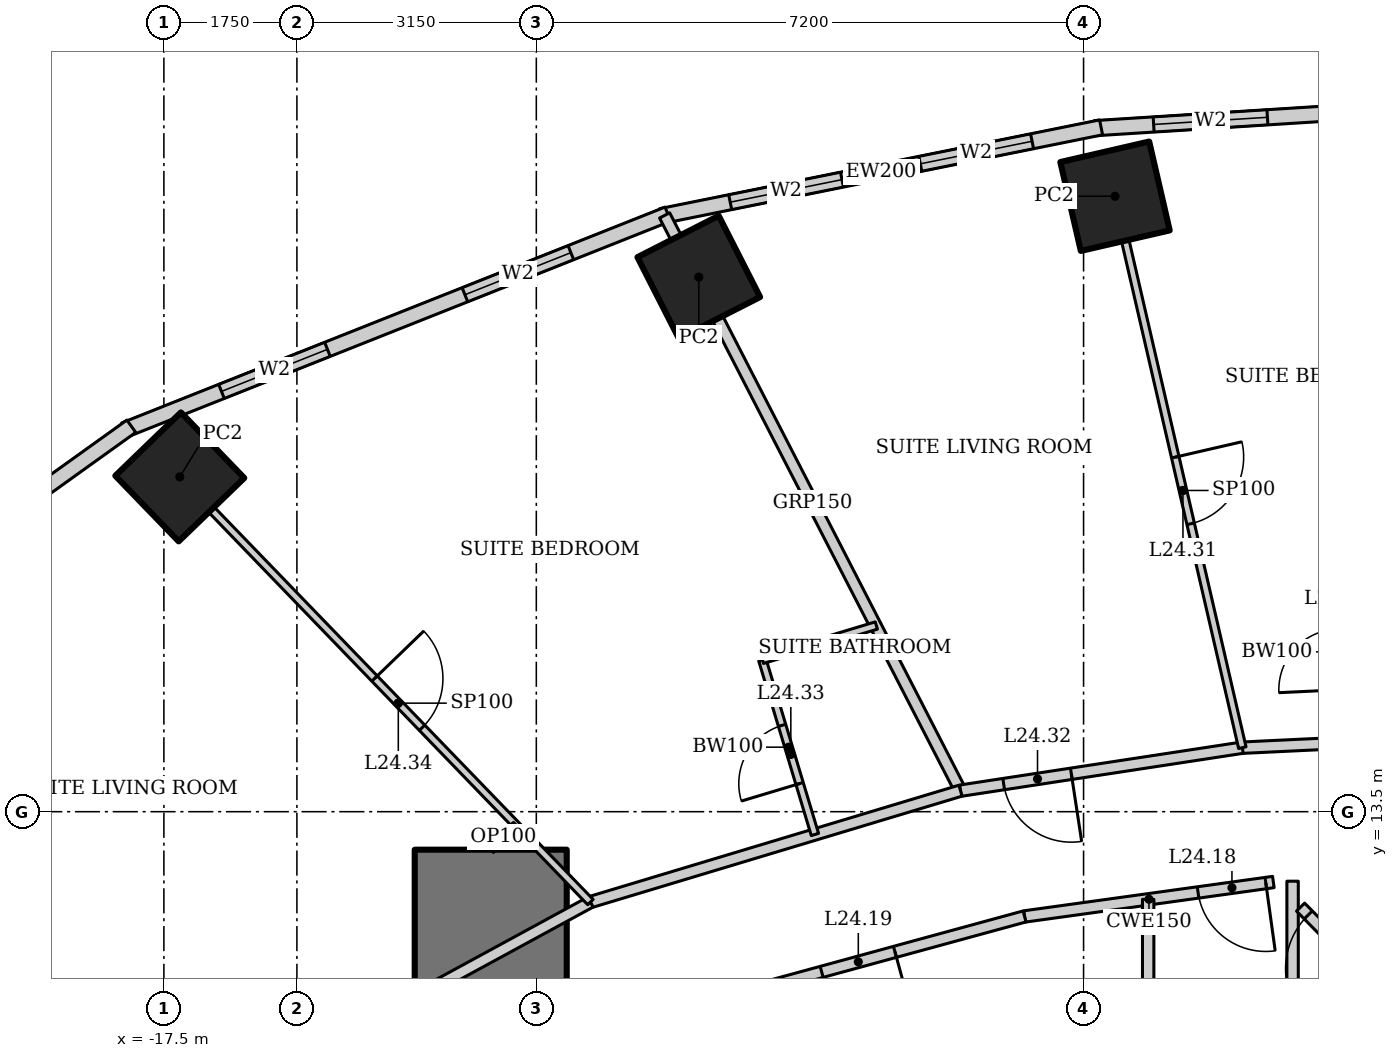
"""IFC4 building model, lengths in metres.
Left out: names, types, materials, properties, quantities, classifications, styles, units other than length and angle.
Written with IfcOpenShell. Run it as: python <this file> out.ifc"""

import sys

from ifc_helpers import new_model, si_unit, direction, frame, frame_2d, origin, origin_2d, place, context, subcontext, project, spatial, rectangle, hollow_rectangle, extrude, element, fill, save


model = new_model("IFC4")
c1 = context("Model", 3, precision=1e-05, world=origin(), true_north=direction((0.0, 1.0)))
c2 = subcontext(c1, "Body", "Model", "MODEL_VIEW")
j1 = project(units=[si_unit("LENGTHUNIT", "METRE"), si_unit("PLANEANGLEUNIT", "RADIAN")], contexts=[c1])
p1 = place(None, origin())
s1 = spatial("IfcSite", under=j1, at=p1, CompositionType="ELEMENT")
p2 = place(p1, origin())
s2 = spatial("IfcBuilding", under=s1, at=p2, CompositionType="ELEMENT")
p3 = place(p2, frame((0.0, 0.0, 101.8)))
s3 = spatial("IfcBuildingStorey", under=s2, at=p3, CompositionType="ELEMENT", Elevation=101.8)
for number, where, z_axis, x_axis in (
    (1, (-4.986, 21.598, 0.0), (0.0, 0.0, 1.0), (0.974, 0.225, 0.0)),
    (2, (-10.463, 20.534, 0.0), (0.0, 0.0, 1.0), (0.891, 0.454, 0.0)),
    (3, (-17.291, 17.905, 0.0), (0.0, 0.0, 1.0), (0.719, 0.695, 0.0)),
):
    element("IfcColumn", number, at=place(p3, frame(where, z_axis=z_axis, x_axis=x_axis)), inside=s3, PredefinedType="COLUMN", context=c2, shape_type="SweptSolid", body=[
        extrude(hollow_rectangle(XDim=1.2, YDim=1.2, WallThickness=0.1, at=origin_2d()), origin(), (0.0, 0.0, 1.0), 2.28),
    ])
p4 = place(p3, frame((-13.2, 13.0, 0.0), z_axis=(0.0, 0.0, 1.0), x_axis=(0.0, -1.0, 0.0)))
e4 = element("IfcWall", 4, at=p4, inside=s3, PredefinedType="SHEAR", context=c2, shape_type="SweptSolid", body=[
    extrude(rectangle(XDim=26.0, YDim=2.0, at=frame_2d((13.0, 0.0))), origin(), (0.0, 0.0, 1.0), 3.6),
])
p5 = place(p4, frame((12.1, 0.0, 0.0)))
e5 = element("IfcOpeningElement", 5, at=p5, cuts=e4, PredefinedType="OPENING", context=c2, shape_type="SweptSolid", body=[
    extrude(rectangle(XDim=1.8, YDim=2.1, at=frame_2d((0.9, 1.05))), frame((0.0, 1.01, 0.0), z_axis=(0.0, -1.0, 0.0), x_axis=(1.0, 0.0, 0.0)), (0.0, 0.0, 1.0), 2.02),
])
p6 = place(p3, frame((0.041, 22.827, 0.0), z_axis=(0.0, 0.0, 1.0), x_axis=(-0.998018582375, -0.062919863585, 0.0)))
e6 = element("IfcWall", 6, at=p6, inside=s3, PredefinedType="SOLIDWALL", context=c2, shape_type="SweptSolid", body=[
    extrude(rectangle(XDim=5.304, YDim=0.2, at=frame_2d((2.652, 0.0))), origin(), (0.0, 0.0, 1.0), 3.4),
])
p7 = place(p6, frame((0.776, 0.0, 0.5)))
e7 = element("IfcOpeningElement", 7, at=p7, cuts=e6, PredefinedType="OPENING", context=c2, shape_type="SweptSolid", body=[
    extrude(rectangle(XDim=1.5, YDim=2.2, at=frame_2d((0.75, 1.1))), frame((0.0, 0.11, 0.0), z_axis=(0.0, -1.0, 0.0), x_axis=(1.0, 0.0, 0.0)), (0.0, 0.0, 1.0), 0.22),
])
p8 = place(p6, frame((3.028, 0.0, 0.5)))
e8 = element("IfcOpeningElement", 8, at=p8, cuts=e6, PredefinedType="OPENING", context=c2, shape_type="SweptSolid", body=[
    extrude(rectangle(XDim=1.5, YDim=2.2, at=frame_2d((0.75, 1.1))), frame((0.0, 0.11, 0.0), z_axis=(0.0, -1.0, 0.0), x_axis=(1.0, 0.0, 0.0)), (0.0, 0.0, 1.0), 0.22),
])
p9 = place(p3, frame((-5.17, 22.504, 0.0), z_axis=(0.0, 0.0, 1.0), x_axis=(-0.980251657452, -0.197754110105, 0.0)))
e9 = element("IfcWall", 9, at=p9, inside=s3, PredefinedType="SOLIDWALL", context=c2, shape_type="SweptSolid", body=[
    extrude(rectangle(XDim=5.904, YDim=0.2, at=frame_2d((2.952, 0.0))), origin(), (0.0, 0.0, 1.0), 3.4),
])
p10 = place(p9, frame((0.926, 0.0, 0.5)))
e10 = element("IfcOpeningElement", 10, at=p10, cuts=e9, PredefinedType="OPENING", context=c2, shape_type="SweptSolid", body=[
    extrude(rectangle(XDim=1.5, YDim=2.2, at=frame_2d((0.75, 1.1))), frame((0.0, 0.11, 0.0), z_axis=(0.0, -1.0, 0.0), x_axis=(1.0, 0.0, 0.0)), (0.0, 0.0, 1.0), 0.22),
])
p11 = place(p9, frame((3.478, 0.0, 0.5)))
e11 = element("IfcOpeningElement", 11, at=p11, cuts=e9, PredefinedType="OPENING", context=c2, shape_type="SweptSolid", body=[
    extrude(rectangle(XDim=1.5, YDim=2.2, at=frame_2d((0.75, 1.1))), frame((0.0, 0.11, 0.0), z_axis=(0.0, -1.0, 0.0), x_axis=(1.0, 0.0, 0.0)), (0.0, 0.0, 1.0), 0.22),
])
p12 = place(p3, frame((-10.869, 21.363, 0.0), z_axis=(0.0, 0.0, 1.0), x_axis=(-0.929358351251, -0.369178892895, 0.0)))
e12 = element("IfcWall", 12, at=p12, inside=s3, PredefinedType="SOLIDWALL", context=c2, shape_type="SweptSolid", body=[
    extrude(rectangle(XDim=7.692, YDim=0.2, at=frame_2d((3.846, 0.0))), origin(), (0.0, 0.0, 1.0), 3.4),
])
p13 = place(p12, frame((1.373, 0.0, 0.5)))
e13 = element("IfcOpeningElement", 13, at=p13, cuts=e12, PredefinedType="OPENING", context=c2, shape_type="SweptSolid", body=[
    extrude(rectangle(XDim=1.5, YDim=2.2, at=frame_2d((0.75, 1.1))), frame((0.0, 0.11, 0.0), z_axis=(0.0, -1.0, 0.0), x_axis=(1.0, 0.0, 0.0)), (0.0, 0.0, 1.0), 0.22),
])
p14 = place(p12, frame((4.819, 0.0, 0.5)))
e14 = element("IfcOpeningElement", 14, at=p14, cuts=e12, PredefinedType="OPENING", context=c2, shape_type="SweptSolid", body=[
    extrude(rectangle(XDim=1.5, YDim=2.2, at=frame_2d((0.75, 1.1))), frame((0.0, 0.11, 0.0), z_axis=(0.0, -1.0, 0.0), x_axis=(1.0, 0.0, 0.0)), (0.0, 0.0, 1.0), 0.22),
])
p15 = place(p3, frame((-17.929, 18.572, 0.0), z_axis=(0.0, 0.0, 1.0), x_axis=(-0.812791321576, -0.582554948112, 0.0)))
e15 = element("IfcWall", 15, at=p15, inside=s3, PredefinedType="SOLIDWALL", context=c2, shape_type="SweptSolid", body=[
    extrude(rectangle(XDim=8.063, YDim=0.2, at=frame_2d((4.032, 0.0))), origin(), (0.0, 0.0, 1.0), 3.4),
])
p16 = place(p15, frame((1.466, 0.0, 0.5)))
e16 = element("IfcOpeningElement", 16, at=p16, cuts=e15, PredefinedType="OPENING", context=c2, shape_type="SweptSolid", body=[
    extrude(rectangle(XDim=1.5, YDim=2.2, at=frame_2d((0.75, 1.1))), frame((0.0, 0.11, 0.0), z_axis=(0.0, -1.0, 0.0), x_axis=(1.0, 0.0, 0.0)), (0.0, 0.0, 1.0), 0.22),
])
p17 = place(p15, frame((5.097, 0.0, 0.5)))
e17 = element("IfcOpeningElement", 17, at=p17, cuts=e15, PredefinedType="OPENING", context=c2, shape_type="SweptSolid", body=[
    extrude(rectangle(XDim=1.5, YDim=2.2, at=frame_2d((0.75, 1.1))), frame((0.0, 0.11, 0.0), z_axis=(0.0, -1.0, 0.0), x_axis=(1.0, 0.0, 0.0)), (0.0, 0.0, 1.0), 0.22),
])
p18 = place(p3, frame((-10.912, 21.346, 0.0), z_axis=(0.0, 0.0, 1.0), x_axis=(0.457327273085, -0.889298468059, 0.0)))
e18 = element("IfcWall", 18, at=p18, inside=s3, PredefinedType="PARTITIONING", context=c2, shape_type="SweptSolid", body=[
    extrude(rectangle(XDim=8.511, YDim=0.15, at=frame_2d((4.256, 0.0))), origin(), (0.0, 0.0, 1.0), 2.463),
])
p19 = place(p3, frame((0.0, 14.5, 0.0), z_axis=(0.0, 0.0, 1.0), x_axis=(-0.998863968075, -0.047652631422, 0.0)))
e19 = element("IfcWall", 19, at=p19, inside=s3, PredefinedType="PARTITIONING", context=c2, shape_type="SweptSolid", body=[
    extrude(rectangle(XDim=3.315, YDim=0.15, at=frame_2d((1.657, 0.0))), origin(), (0.0, 0.0, 1.0), 3.4),
])
p20 = place(p3, frame((-3.311, 14.342, 0.0), z_axis=(0.0, 0.0, 1.0), x_axis=(-0.988564270062, -0.150800145746, 0.0)))
e20 = element("IfcWall", 20, at=p20, inside=s3, PredefinedType="PARTITIONING", context=c2, shape_type="SweptSolid", body=[
    extrude(rectangle(XDim=3.751, YDim=0.15, at=frame_2d((1.875, 0.0))), origin(), (0.0, 0.0, 1.0), 3.4),
])
p21 = place(p20, frame((2.276, 0.0, 0.0)))
e21 = element("IfcOpeningElement", 21, at=p21, cuts=e20, PredefinedType="OPENING", context=c2, shape_type="SweptSolid", body=[
    extrude(rectangle(XDim=0.9, YDim=2.1, at=frame_2d((0.45, 1.05))), frame((0.0, 0.085, 0.0), z_axis=(0.0, -1.0, 0.0), x_axis=(1.0, 0.0, 0.0)), (0.0, 0.0, 1.0), 0.17),
])
p22 = place(p3, frame((-7.019, 13.776, 0.0), z_axis=(0.0, 0.0, 1.0), x_axis=(-0.957564241242, -0.288219922793, 0.0)))
e22 = element("IfcWall", 22, at=p22, inside=s3, PredefinedType="PARTITIONING", context=c2, shape_type="SweptSolid", body=[
    extrude(rectangle(XDim=5.085, YDim=0.15, at=frame_2d((2.542, 0.0))), origin(), (0.0, 0.0, 1.0), 3.4),
])
p23 = place(p3, frame((-11.888, 12.311, 0.0), z_axis=(0.0, 0.0, 1.0), x_axis=(-0.878450059298, -0.477834169267, 0.0)))
e23 = element("IfcWall", 23, at=p23, inside=s3, PredefinedType="PARTITIONING", context=c2, shape_type="SweptSolid", body=[
    extrude(rectangle(XDim=5.631, YDim=0.15, at=frame_2d((2.815, 0.0))), origin(), (0.0, 0.0, 1.0), 3.4),
])
p24 = place(p3, frame((-2.903, 12.574, 0.0), z_axis=(0.0, 0.0, 1.0), x_axis=(-0.990563451353, -0.137054911782, 0.0)))
e24 = element("IfcWall", 24, at=p24, inside=s3, PredefinedType="PARTITIONING", context=c2, shape_type="SweptSolid", body=[
    extrude(rectangle(XDim=3.304, YDim=0.15, at=frame_2d((1.652, 0.0))), origin(), (0.0, 0.0, 1.0), 3.4),
])
p25 = place(p24, frame((0.1, 0.0, 0.0)))
e25 = element("IfcOpeningElement", 25, at=p25, cuts=e24, PredefinedType="OPENING", context=c2, shape_type="SweptSolid", body=[
    extrude(rectangle(XDim=0.9, YDim=2.1, at=frame_2d((0.45, 1.05))), frame((0.0, 0.085, 0.0), z_axis=(0.0, -1.0, 0.0), x_axis=(1.0, 0.0, 0.0)), (0.0, 0.0, 1.0), 0.17),
])
p26 = place(p3, frame((-6.176, 12.122, 0.0), z_axis=(0.0, 0.0, 1.0), x_axis=(-0.964644466646, -0.263554648923, 0.0)))
e26 = element("IfcWall", 26, at=p26, inside=s3, PredefinedType="PARTITIONING", context=c2, shape_type="SweptSolid", body=[
    extrude(rectangle(XDim=4.535, YDim=0.15, at=frame_2d((2.268, 0.0))), origin(), (0.0, 0.0, 1.0), 3.4),
])
p27 = place(p26, frame((1.768, 0.0, 0.0)))
e27 = element("IfcOpeningElement", 27, at=p27, cuts=e26, PredefinedType="OPENING", context=c2, shape_type="SweptSolid", body=[
    extrude(rectangle(XDim=1.0, YDim=2.1, at=frame_2d((0.5, 1.05))), frame((0.0, 0.085, 0.0), z_axis=(0.0, -1.0, 0.0), x_axis=(1.0, 0.0, 0.0)), (0.0, 0.0, 1.0), 0.17),
])
p28 = place(p3, frame((-2.65, 9.2, 0.0), z_axis=(0.0, 0.0, 1.0), x_axis=(0.0, 1.0, 0.0)))
e28 = element("IfcWall", 28, at=p28, inside=s3, PredefinedType="SOLIDWALL", context=c2, shape_type="SweptSolid", body=[
    extrude(rectangle(XDim=3.385, YDim=0.15, at=frame_2d((1.693, 0.0))), origin(), (0.0, 0.0, 1.0), 2.554),
])
p29 = place(p3, frame((-4.55, 9.2, 0.0), z_axis=(0.0, 0.0, 1.0), x_axis=(0.0, 1.0, 0.0)))
e29 = element("IfcWall", 29, at=p29, inside=s3, PredefinedType="SOLIDWALL", context=c2, shape_type="SweptSolid", body=[
    extrude(rectangle(XDim=3.147, YDim=0.15, at=frame_2d((1.573, 0.0))), origin(), (0.0, 0.0, 1.0), 3.4),
])
p30 = place(p3, frame((-4.874, 21.111, 0.0), z_axis=(0.0, 0.0, 1.0), x_axis=(0.224957040173, -0.974368682828, 0.0)))
e30 = element("IfcWall", 30, at=p30, inside=s3, PredefinedType="PARTITIONING", context=c2, shape_type="SweptSolid", body=[
    extrude(rectangle(XDim=6.947, YDim=0.1, at=frame_2d((3.473, 0.0))), origin(), (0.0, 0.0, 1.0), 2.554),
])
p31 = place(p30, frame((3.023, 0.0, 0.0)))
e31 = element("IfcOpeningElement", 31, at=p31, cuts=e30, PredefinedType="OPENING", context=c2, shape_type="SweptSolid", body=[
    extrude(rectangle(XDim=0.9, YDim=2.1, at=frame_2d((0.45, 1.05))), frame((0.0, 0.06, 0.0), z_axis=(0.0, -1.0, 0.0), x_axis=(1.0, 0.0, 0.0)), (0.0, 0.0, 1.0), 0.12),
])
p32 = place(p3, frame((-8.935, 13.2, 0.0), z_axis=(0.0, 0.0, 1.0), x_axis=(-0.288197066254, 0.957571120598, 0.0)))
e32 = element("IfcWall", 32, at=p32, inside=s3, PredefinedType="PARTITIONING", context=c2, shape_type="SweptSolid", body=[
    extrude(rectangle(XDim=2.4, YDim=0.1, at=frame_2d((1.2, 0.0))), origin(), (0.0, 0.0, 1.0), 3.4),
])
p33 = place(p32, frame((0.7, 0.0, 0.0)))
e33 = element("IfcOpeningElement", 33, at=p33, cuts=e32, PredefinedType="OPENING", context=c2, shape_type="SweptSolid", body=[
    extrude(rectangle(XDim=0.8, YDim=2.1, at=frame_2d((0.4, 1.05))), frame((0.0, 0.06, 0.0), z_axis=(0.0, -1.0, 0.0), x_axis=(1.0, 0.0, 0.0)), (0.0, 0.0, 1.0), 0.12),
])
p34 = place(p3, frame((-9.626, 15.498, 0.0), z_axis=(0.0, 0.0, 1.0), x_axis=(0.957551231109, 0.288263143328, 0.0)))
e34 = element("IfcWall", 34, at=p34, inside=s3, PredefinedType="PARTITIONING", context=c2, shape_type="SweptSolid", body=[
    extrude(rectangle(XDim=1.566, YDim=0.1, at=frame_2d((0.783, 0.0))), origin(), (0.0, 0.0, 1.0), 3.4),
])
p35 = place(p3, frame((-16.944, 17.545, 0.0), z_axis=(0.0, 0.0, 1.0), x_axis=(0.694669949151, -0.719328618746, 0.0)))
e35 = element("IfcWall", 35, at=p35, inside=s3, PredefinedType="PARTITIONING", context=c2, shape_type="SweptSolid", body=[
    extrude(rectangle(XDim=7.277, YDim=0.1, at=frame_2d((3.639, 0.0))), origin(), (0.0, 0.0, 1.0), 2.463),
])
p36 = place(p35, frame((3.189, 0.0, 0.0)))
e36 = element("IfcOpeningElement", 36, at=p36, cuts=e35, PredefinedType="OPENING", context=c2, shape_type="SweptSolid", body=[
    extrude(rectangle(XDim=0.9, YDim=2.1, at=frame_2d((0.45, 1.05))), frame((0.0, 0.06, 0.0), z_axis=(0.0, -1.0, 0.0), x_axis=(1.0, 0.0, 0.0)), (0.0, 0.0, 1.0), 0.12),
])
p37 = place(p3, frame((-23.171, 13.24, 0.0), z_axis=(0.0, 0.0, 1.0), x_axis=(0.868253436131, -0.496120923412, 0.0)))
e37 = element("IfcWall", 37, at=p37, inside=s3, PredefinedType="PARTITIONING", context=c2, shape_type="SweptSolid", body=[
    extrude(rectangle(XDim=7.297, YDim=0.1, at=frame_2d((3.649, 0.0))), origin(), (0.0, 0.0, 1.0), 2.2),
])
p38 = place(p37, frame((3.198, 0.0, 0.0)))
e38 = element("IfcOpeningElement", 38, at=p38, cuts=e37, PredefinedType="OPENING", context=c2, shape_type="SweptSolid", body=[
    extrude(rectangle(XDim=0.9, YDim=2.1, at=frame_2d((0.45, 1.05))), frame((0.0, 0.06, 0.0), z_axis=(0.0, -1.0, 0.0), x_axis=(1.0, 0.0, 0.0)), (0.0, 0.0, 1.0), 0.12),
])
p39 = place(p3, frame((-13.2, 13.0, 0.0), z_axis=(0.0, 0.0, 1.0), x_axis=(0.719347134512, 0.69465077562, 0.0)))
e39 = element("IfcWall", 39, at=p39, inside=s3, PredefinedType="PARTITIONING", context=c2, shape_type="SweptSolid", body=[
    extrude(rectangle(XDim=0.465, YDim=0.1, at=frame_2d((0.232, 0.0))), origin(), (0.0, 0.0, 1.0), 3.4),
])
p40 = place(p3, frame((-1.532, 11.215, 0.0), z_axis=(0.0, 0.0, 1.0), x_axis=(-0.701250244986, 0.712915208077, 0.0)))
e40 = element("IfcWall", 40, at=p40, inside=s3, PredefinedType="PARTITIONING", context=c2, shape_type="SweptSolid", body=[
    extrude(rectangle(XDim=1.444, YDim=0.15, at=frame_2d((0.722, 0.0))), origin(), (0.0, 0.0, 1.0), 3.4),
])
p41 = place(p40, frame((0.3, 0.0, 0.0)))
e41 = element("IfcOpeningElement", 41, at=p41, cuts=e40, PredefinedType="OPENING", context=c2, shape_type="SweptSolid", body=[
    extrude(rectangle(XDim=1.0, YDim=2.1, at=frame_2d((0.5, 1.05))), frame((0.0, 0.085, 0.0), z_axis=(0.0, -1.0, 0.0), x_axis=(1.0, 0.0, 0.0)), (0.0, 0.0, 1.0), 0.17),
])
p42 = place(p8, origin())
e42 = element("IfcWindow", 42, at=p42, inside=s3, PartitioningType="SINGLE_PANEL", PredefinedType="WINDOW", context=c2, shape_type="SweptSolid", body=[
    extrude(rectangle(XDim=1.5, YDim=2.2, at=frame_2d((0.75, 1.1))), frame((0.0, 0.03, 0.0), z_axis=(0.0, -1.0, 0.0), x_axis=(1.0, 0.0, 0.0)), (0.0, 0.0, 1.0), 0.06),
])
fill(e8, e42)
p43 = place(p10, origin())
e43 = element("IfcWindow", 43, at=p43, inside=s3, PartitioningType="SINGLE_PANEL", PredefinedType="WINDOW", context=c2, shape_type="SweptSolid", body=[
    extrude(rectangle(XDim=1.5, YDim=2.2, at=frame_2d((0.75, 1.1))), frame((0.0, 0.03, 0.0), z_axis=(0.0, -1.0, 0.0), x_axis=(1.0, 0.0, 0.0)), (0.0, 0.0, 1.0), 0.06),
])
fill(e10, e43)
p44 = place(p11, origin())
e44 = element("IfcWindow", 44, at=p44, inside=s3, PartitioningType="SINGLE_PANEL", PredefinedType="WINDOW", context=c2, shape_type="SweptSolid", body=[
    extrude(rectangle(XDim=1.5, YDim=2.2, at=frame_2d((0.75, 1.1))), frame((0.0, 0.03, 0.0), z_axis=(0.0, -1.0, 0.0), x_axis=(1.0, 0.0, 0.0)), (0.0, 0.0, 1.0), 0.06),
])
fill(e11, e44)
p45 = place(p13, origin())
e45 = element("IfcWindow", 45, at=p45, inside=s3, PartitioningType="SINGLE_PANEL", PredefinedType="WINDOW", context=c2, shape_type="SweptSolid", body=[
    extrude(rectangle(XDim=1.5, YDim=2.2, at=frame_2d((0.75, 1.1))), frame((0.0, 0.03, 0.0), z_axis=(0.0, -1.0, 0.0), x_axis=(1.0, 0.0, 0.0)), (0.0, 0.0, 1.0), 0.06),
])
fill(e13, e45)
p46 = place(p14, origin())
e46 = element("IfcWindow", 46, at=p46, inside=s3, PartitioningType="SINGLE_PANEL", PredefinedType="WINDOW", context=c2, shape_type="SweptSolid", body=[
    extrude(rectangle(XDim=1.5, YDim=2.2, at=frame_2d((0.75, 1.1))), frame((0.0, 0.03, 0.0), z_axis=(0.0, -1.0, 0.0), x_axis=(1.0, 0.0, 0.0)), (0.0, 0.0, 1.0), 0.06),
])
fill(e14, e46)
p47 = place(p41, origin())
e47 = element("IfcDoor", 47, at=p47, inside=s3, OperationType="SINGLE_SWING_LEFT", PredefinedType="DOOR", context=c2, shape_type="SweptSolid", body=[
    extrude(rectangle(XDim=1.0, YDim=2.1, at=frame_2d((0.5, 1.05))), frame((0.0, 0.025, 0.0), z_axis=(0.0, -1.0, 0.0), x_axis=(1.0, 0.0, 0.0)), (0.0, 0.0, 1.0), 0.05),
])
fill(e41, e47)
p48 = place(p25, origin())
e48 = element("IfcDoor", 48, at=p48, inside=s3, OperationType="SINGLE_SWING_LEFT", PredefinedType="DOOR", context=c2, shape_type="SweptSolid", body=[
    extrude(rectangle(XDim=0.9, YDim=2.1, at=frame_2d((0.45, 1.05))), frame((0.0, 0.025, 0.0), z_axis=(0.0, -1.0, 0.0), x_axis=(1.0, 0.0, 0.0)), (0.0, 0.0, 1.0), 0.05),
])
fill(e25, e48)
p49 = place(p27, origin())
e49 = element("IfcDoor", 49, at=p49, inside=s3, OperationType="SINGLE_SWING_LEFT", PredefinedType="DOOR", context=c2, shape_type="SweptSolid", body=[
    extrude(rectangle(XDim=1.0, YDim=2.1, at=frame_2d((0.5, 1.05))), frame((0.0, 0.025, 0.0), z_axis=(0.0, -1.0, 0.0), x_axis=(1.0, 0.0, 0.0)), (0.0, 0.0, 1.0), 0.05),
])
fill(e27, e49)
p50 = place(p31, origin())
e50 = element("IfcDoor", 50, at=p50, inside=s3, OperationType="SINGLE_SWING_LEFT", PredefinedType="DOOR", context=c2, shape_type="SweptSolid", body=[
    extrude(rectangle(XDim=0.9, YDim=2.1, at=frame_2d((0.45, 1.05))), frame((0.0, 0.025, 0.0), z_axis=(0.0, -1.0, 0.0), x_axis=(1.0, 0.0, 0.0)), (0.0, 0.0, 1.0), 0.05),
])
fill(e31, e50)
p51 = place(p21, origin())
e51 = element("IfcDoor", 51, at=p51, inside=s3, OperationType="SINGLE_SWING_LEFT", PredefinedType="DOOR", context=c2, shape_type="SweptSolid", body=[
    extrude(rectangle(XDim=0.9, YDim=2.1, at=frame_2d((0.45, 1.05))), frame((0.0, 0.025, 0.0), z_axis=(0.0, -1.0, 0.0), x_axis=(1.0, 0.0, 0.0)), (0.0, 0.0, 1.0), 0.05),
])
fill(e21, e51)
p52 = place(p33, origin())
e52 = element("IfcDoor", 52, at=p52, inside=s3, OperationType="SINGLE_SWING_LEFT", PredefinedType="DOOR", context=c2, shape_type="SweptSolid", body=[
    extrude(rectangle(XDim=0.8, YDim=2.1, at=frame_2d((0.4, 1.05))), frame((0.0, 0.025, 0.0), z_axis=(0.0, -1.0, 0.0), x_axis=(1.0, 0.0, 0.0)), (0.0, 0.0, 1.0), 0.05),
])
fill(e33, e52)
p53 = place(p36, origin())
e53 = element("IfcDoor", 53, at=p53, inside=s3, OperationType="SINGLE_SWING_LEFT", PredefinedType="DOOR", context=c2, shape_type="SweptSolid", body=[
    extrude(rectangle(XDim=0.9, YDim=2.1, at=frame_2d((0.45, 1.05))), frame((0.0, 0.025, 0.0), z_axis=(0.0, -1.0, 0.0), x_axis=(1.0, 0.0, 0.0)), (0.0, 0.0, 1.0), 0.05),
])
fill(e36, e53)
save(model, sys.argv[1])
